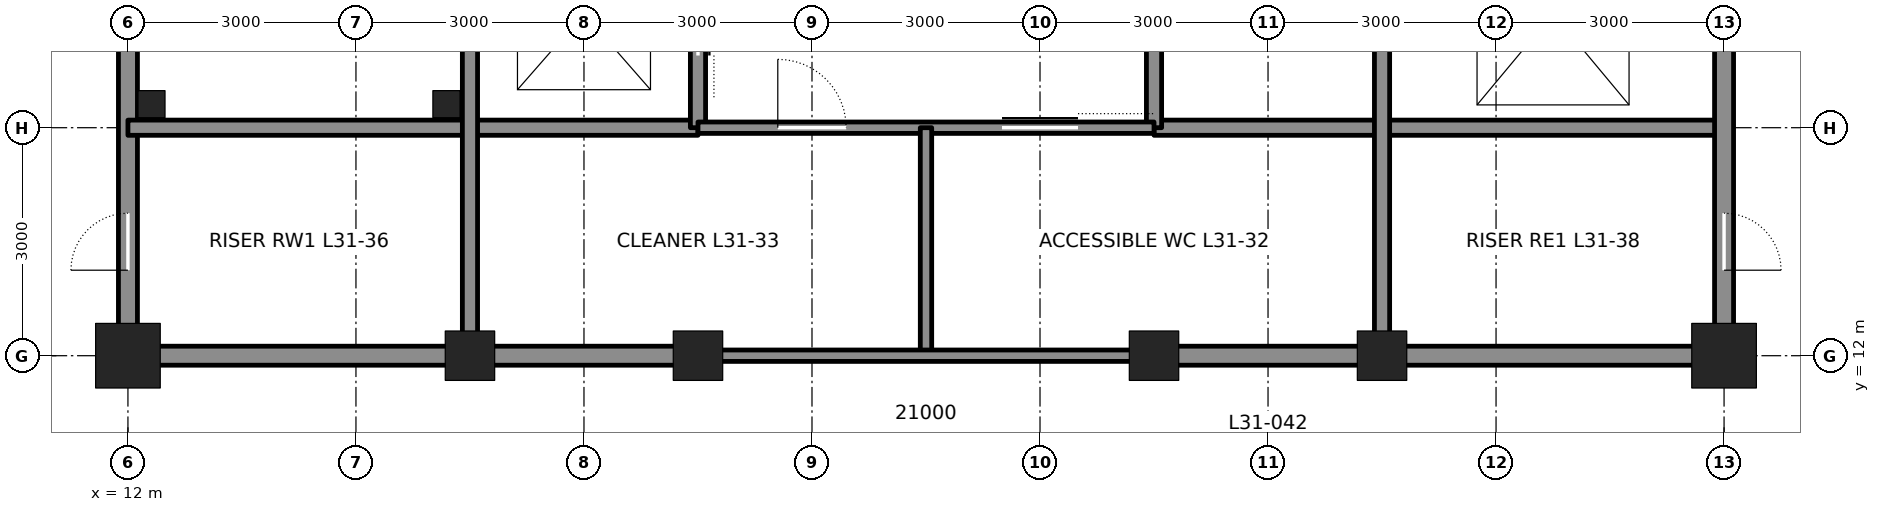
"""IFC4 building model, lengths in metres.
Left out: names, types, materials, properties, quantities, classifications, styles, units other than length and angle.
Written with IfcOpenShell. Run it as: python <this file> out.ifc"""

import sys

from ifc_helpers import new_model, si_unit, direction, frame, frame_2d, origin, origin_2d, place, context, subcontext, project, spatial, rectangle, hollow_rectangle, extrude, element, fill, save


model = new_model("IFC4")
c1 = context("Model", 3, precision=1e-05, world=origin(), true_north=direction((0.0, 1.0)))
c2 = subcontext(c1, "Body", "Model", "MODEL_VIEW")
j1 = project(units=[si_unit("LENGTHUNIT", "METRE"), si_unit("PLANEANGLEUNIT", "RADIAN")], contexts=[c1])
p1 = place(None, origin())
s1 = spatial("IfcSite", under=j1, at=p1, CompositionType="ELEMENT")
p2 = place(p1, origin())
s2 = spatial("IfcBuilding", under=s1, at=p2, CompositionType="ELEMENT")
p3 = place(p2, frame((0.0, 0.0, 144.6)))
s3 = spatial("IfcBuildingStorey", under=s2, at=p3, CompositionType="ELEMENT", Elevation=144.6)
p4 = place(p3, frame((12.0, 12.0, 0.0), z_axis=(0.0, 0.0, 1.0), x_axis=(1.0, 0.0, 0.0)))
e1 = element("IfcColumn", 1, at=p4, inside=s3, PredefinedType="COLUMN", context=c2, shape_type="SweptSolid", body=[
    extrude(hollow_rectangle(XDim=0.85, YDim=0.85, WallThickness=0.085, at=origin_2d()), origin(), (0.0, 0.0, 1.0), 4.2),
])
for number, where, z_axis, x_axis in (
    (2, (16.5, 12.0, 0.0), (0.0, 0.0, 1.0), (1.0, 0.0, 0.0)),
    (3, (19.5, 12.0, 0.0), (0.0, 0.0, 1.0), (1.0, 0.0, 0.0)),
    (4, (25.5, 12.0, 0.0), (0.0, 0.0, 1.0), (1.0, 0.0, 0.0)),
    (5, (28.5, 12.0, 0.0), (0.0, 0.0, 1.0), (1.0, 0.0, 0.0)),
):
    element("IfcColumn", number, at=place(p3, frame(where, z_axis=z_axis, x_axis=x_axis)), inside=s3, PredefinedType="COLUMN", context=c2, shape_type="SweptSolid", body=[
        extrude(hollow_rectangle(XDim=0.65, YDim=0.65, WallThickness=0.065, at=origin_2d()), origin(), (0.0, 0.0, 1.0), 4.2),
    ])
p5 = place(p3, frame((33.0, 12.0, 0.0), z_axis=(0.0, 0.0, 1.0), x_axis=(1.0, 0.0, 0.0)))
e6 = element("IfcColumn", 6, at=p5, inside=s3, PredefinedType="COLUMN", context=c2, shape_type="SweptSolid", body=[
    extrude(hollow_rectangle(XDim=0.85, YDim=0.85, WallThickness=0.085, at=origin_2d()), origin(), (0.0, 0.0, 1.0), 4.2),
])
p6 = place(p3, frame((12.0, 12.25, 0.0), z_axis=(0.0, 0.0, 1.0), x_axis=(0.0, 1.0, 0.0)))
e7 = element("IfcWall", 7, at=p6, inside=s3, PredefinedType="SOLIDWALL", context=c2, shape_type="SweptSolid", body=[
    extrude(rectangle(XDim=8.5, YDim=0.25, at=frame_2d((4.25, 0.0))), origin(), (0.0, 0.0, 1.0), 3.113),
])
p7 = place(p6, frame((0.875, 0.0, 0.0)))
e8 = element("IfcOpeningElement", 8, at=p7, cuts=e7, PredefinedType="OPENING", context=c2, shape_type="SweptSolid", body=[
    extrude(rectangle(XDim=0.75, YDim=2.1, at=frame_2d((0.375, 1.05))), frame((0.0, 0.135, 0.0), z_axis=(0.0, -1.0, 0.0), x_axis=(1.0, 0.0, 0.0)), (0.0, 0.0, 1.0), 0.27),
])
p8 = place(p3, frame((12.25, 12.0, 0.0), z_axis=(0.0, 0.0, 1.0), x_axis=(1.0, 0.0, 0.0)))
e9 = element("IfcWall", 9, at=p8, inside=s3, PredefinedType="SOLIDWALL", context=c2, shape_type="SweptSolid", body=[
    extrude(rectangle(XDim=4.0, YDim=0.25, at=frame_2d((2.0, 0.0))), origin(), (0.0, 0.0, 1.0), 3.181),
])
for number, where, z_axis, x_axis in (
    (10, (16.75, 12.0, 0.0), (0.0, 0.0, 1.0), (1.0, 0.0, 0.0)),
    (11, (25.75, 12.0, 0.0), (0.0, 0.0, 1.0), (1.0, 0.0, 0.0)),
):
    element("IfcWall", number, at=place(p3, frame(where, z_axis=z_axis, x_axis=x_axis)), inside=s3, PredefinedType="SOLIDWALL", context=c2, shape_type="SweptSolid", body=[
        extrude(rectangle(XDim=2.5, YDim=0.25, at=frame_2d((1.25, 0.0))), origin(), (0.0, 0.0, 1.0), 3.181),
    ])
p9 = place(p3, frame((28.75, 12.0, 0.0), z_axis=(0.0, 0.0, 1.0), x_axis=(1.0, 0.0, 0.0)))
e12 = element("IfcWall", 12, at=p9, inside=s3, PredefinedType="SOLIDWALL", context=c2, shape_type="SweptSolid", body=[
    extrude(rectangle(XDim=4.0, YDim=0.25, at=frame_2d((2.0, 0.0))), origin(), (0.0, 0.0, 1.0), 3.181),
])
for number, where, z_axis, x_axis in (
    (13, (12.0, 15.0, 0.0), (0.0, 0.0, 1.0), (1.0, 0.0, 0.0)),
    (14, (25.5, 15.0, 0.0), (0.0, 0.0, 1.0), (1.0, 0.0, 0.0)),
):
    element("IfcWall", number, at=place(p3, frame(where, z_axis=z_axis, x_axis=x_axis)), inside=s3, PredefinedType="SOLIDWALL", context=c2, shape_type="SweptSolid", body=[
        extrude(rectangle(XDim=7.5, YDim=0.2, at=frame_2d((3.75, 0.0))), origin(), (0.0, 0.0, 1.0), 4.04),
    ])
p10 = place(p3, frame((16.5, 12.25, 0.0), z_axis=(0.0, 0.0, 1.0), x_axis=(0.0, 1.0, 0.0)))
e15 = element("IfcWall", 15, at=p10, inside=s3, PredefinedType="SOLIDWALL", context=c2, shape_type="SweptSolid", body=[
    extrude(rectangle(XDim=8.5, YDim=0.2, at=frame_2d((4.25, 0.0))), origin(), (0.0, 0.0, 1.0), 3.113),
])
p11 = place(p3, frame((19.5, 15.0, 0.0), z_axis=(0.0, 0.0, 1.0), x_axis=(0.0, 1.0, 0.0)))
e16 = element("IfcWall", 16, at=p11, inside=s3, PredefinedType="SOLIDWALL", context=c2, shape_type="SweptSolid", body=[
    extrude(rectangle(XDim=12.0, YDim=0.2, at=frame_2d((6.0, 0.0))), origin(), (0.0, 0.0, 1.0), 3.064),
])
p12 = place(p11, frame((0.95, 0.0, 0.0)))
e17 = element("IfcOpeningElement", 17, at=p12, cuts=e16, PredefinedType="OPENING", context=c2, shape_type="SweptSolid", body=[
    extrude(rectangle(XDim=1.1, YDim=2.1, at=frame_2d((0.55, 1.05))), frame((0.0, 0.11, 0.0), z_axis=(0.0, -1.0, 0.0), x_axis=(1.0, 0.0, 0.0)), (0.0, 0.0, 1.0), 0.22),
])
p13 = place(p11, frame((3.95, 0.0, 0.0)))
e18 = element("IfcOpeningElement", 18, at=p13, cuts=e16, PredefinedType="OPENING", context=c2, shape_type="SweptSolid", body=[
    extrude(rectangle(XDim=1.1, YDim=2.1, at=frame_2d((0.55, 1.05))), frame((0.0, 0.11, 0.0), z_axis=(0.0, -1.0, 0.0), x_axis=(1.0, 0.0, 0.0)), (0.0, 0.0, 1.0), 0.22),
])
p14 = place(p11, frame((6.95, 0.0, 0.0)))
e19 = element("IfcOpeningElement", 19, at=p14, cuts=e16, PredefinedType="OPENING", context=c2, shape_type="SweptSolid", body=[
    extrude(rectangle(XDim=1.1, YDim=2.1, at=frame_2d((0.55, 1.05))), frame((0.0, 0.11, 0.0), z_axis=(0.0, -1.0, 0.0), x_axis=(1.0, 0.0, 0.0)), (0.0, 0.0, 1.0), 0.22),
])
p15 = place(p11, frame((9.95, 0.0, 0.0)))
e20 = element("IfcOpeningElement", 20, at=p15, cuts=e16, PredefinedType="OPENING", context=c2, shape_type="SweptSolid", body=[
    extrude(rectangle(XDim=1.1, YDim=2.1, at=frame_2d((0.55, 1.05))), frame((0.0, 0.11, 0.0), z_axis=(0.0, -1.0, 0.0), x_axis=(1.0, 0.0, 0.0)), (0.0, 0.0, 1.0), 0.22),
])
p16 = place(p3, frame((25.5, 15.0, 0.0), z_axis=(0.0, 0.0, 1.0), x_axis=(0.0, 1.0, 0.0)))
e21 = element("IfcWall", 21, at=p16, inside=s3, PredefinedType="SOLIDWALL", context=c2, shape_type="SweptSolid", body=[
    extrude(rectangle(XDim=12.0, YDim=0.2, at=frame_2d((6.0, 0.0))), origin(), (0.0, 0.0, 1.0), 3.064),
])
p17 = place(p3, frame((28.5, 12.25, 0.0), z_axis=(0.0, 0.0, 1.0), x_axis=(0.0, 1.0, 0.0)))
e22 = element("IfcWall", 22, at=p17, inside=s3, PredefinedType="SOLIDWALL", context=c2, shape_type="SweptSolid", body=[
    extrude(rectangle(XDim=8.5, YDim=0.2, at=frame_2d((4.25, 0.0))), origin(), (0.0, 0.0, 1.0), 3.113),
])
p18 = place(p3, frame((33.0, 12.25, 0.0), z_axis=(0.0, 0.0, 1.0), x_axis=(0.0, 1.0, 0.0)))
e23 = element("IfcWall", 23, at=p18, inside=s3, PredefinedType="SOLIDWALL", context=c2, shape_type="SweptSolid", body=[
    extrude(rectangle(XDim=8.5, YDim=0.25, at=frame_2d((4.25, 0.0))), origin(), (0.0, 0.0, 1.0), 3.113),
])
p19 = place(p18, frame((6.65, 0.0, 0.0)))
e24 = element("IfcOpeningElement", 24, at=p19, cuts=e23, PredefinedType="OPENING", context=c2, shape_type="SweptSolid", body=[
    extrude(rectangle(XDim=1.2, YDim=2.1, at=frame_2d((0.6, 1.05))), frame((0.0, 0.135, 0.0), z_axis=(0.0, -1.0, 0.0), x_axis=(1.0, 0.0, 0.0)), (0.0, 0.0, 1.0), 0.27),
])
p20 = place(p18, frame((0.875, 0.0, 0.0)))
e25 = element("IfcOpeningElement", 25, at=p20, cuts=e23, PredefinedType="OPENING", context=c2, shape_type="SweptSolid", body=[
    extrude(rectangle(XDim=0.75, YDim=2.1, at=frame_2d((0.375, 1.05))), frame((0.0, 0.135, 0.0), z_axis=(0.0, -1.0, 0.0), x_axis=(1.0, 0.0, 0.0)), (0.0, 0.0, 1.0), 0.27),
])
p21 = place(p3, frame((19.5, 15.0, 0.0), z_axis=(0.0, 0.0, 1.0), x_axis=(1.0, 0.0, 0.0)))
e26 = element("IfcWall", 26, at=p21, inside=s3, PredefinedType="PARTITIONING", context=c2, shape_type="SweptSolid", body=[
    extrude(rectangle(XDim=6.0, YDim=0.15, at=frame_2d((3.0, 0.0))), origin(), (0.0, 0.0, 1.0), 4.04),
])
p22 = place(p21, frame((4.0, 0.0, 0.0)))
e27 = element("IfcOpeningElement", 27, at=p22, cuts=e26, PredefinedType="OPENING", context=c2, shape_type="SweptSolid", body=[
    extrude(rectangle(XDim=1.0, YDim=2.1, at=frame_2d((0.5, 1.05))), frame((0.0, 0.085, 0.0), z_axis=(0.0, -1.0, 0.0), x_axis=(1.0, 0.0, 0.0)), (0.0, 0.0, 1.0), 0.17),
])
p23 = place(p21, frame((1.05, 0.0, 0.0)))
e28 = element("IfcOpeningElement", 28, at=p23, cuts=e26, PredefinedType="OPENING", context=c2, shape_type="SweptSolid", body=[
    extrude(rectangle(XDim=0.9, YDim=2.1, at=frame_2d((0.45, 1.05))), frame((0.0, 0.085, 0.0), z_axis=(0.0, -1.0, 0.0), x_axis=(1.0, 0.0, 0.0)), (0.0, 0.0, 1.0), 0.17),
])
p24 = place(p3, frame((22.5, 15.0, 0.0), z_axis=(0.0, 0.0, 1.0), x_axis=(0.0, -1.0, 0.0)))
e29 = element("IfcWall", 29, at=p24, inside=s3, PredefinedType="PARTITIONING", context=c2, shape_type="SweptSolid", body=[
    extrude(rectangle(XDim=3.0, YDim=0.15, at=frame_2d((1.5, 0.0))), origin(), (0.0, 0.0, 1.0), 4.04),
])
p25 = place(p3, frame((19.5, 12.0, 0.0), z_axis=(0.0, 0.0, 1.0), x_axis=(1.0, 0.0, 0.0)))
e30 = element("IfcWall", 30, at=p25, inside=s3, PredefinedType="PARTITIONING", context=c2, shape_type="SweptSolid", body=[
    extrude(rectangle(XDim=6.0, YDim=0.15, at=frame_2d((3.0, 0.0))), origin(), (0.0, 0.0, 1.0), 3.181),
])
for number, where, z_axis, x_axis in (
    (31, (12.31, 15.31, 0.0), (0.0, 0.0, 1.0), (1.0, 0.0, 0.0)),
    (32, (16.19, 15.31, 0.0), (0.0, 0.0, 1.0), (1.0, 0.0, 0.0)),
):
    element("IfcColumn", number, at=place(p3, frame(where, z_axis=z_axis, x_axis=x_axis)), inside=s3, PredefinedType="COLUMN", context=c2, shape_type="SweptSolid", body=[
        extrude(hollow_rectangle(XDim=0.356, YDim=0.356, WallThickness=0.015, at=origin_2d()), origin(), (0.0, 0.0, 1.0), 4.2),
    ])
p26 = place(p7, origin())
e33 = element("IfcDoor", 33, at=p26, inside=s3, OperationType="SINGLE_SWING_LEFT", PredefinedType="DOOR", context=c2, shape_type="SweptSolid", body=[
    extrude(rectangle(XDim=0.75, YDim=2.1, at=frame_2d((0.375, 1.05))), frame((0.0, 0.025, 0.0), z_axis=(0.0, -1.0, 0.0), x_axis=(1.0, 0.0, 0.0)), (0.0, 0.0, 1.0), 0.05),
])
fill(e8, e33)
p27 = place(p20, frame((0.75, 0.0, 0.0), z_axis=(0.0, 0.0, 1.0), x_axis=(-1.0, 0.0, 0.0)))
e34 = element("IfcDoor", 34, at=p27, inside=s3, OperationType="SINGLE_SWING_RIGHT", PredefinedType="DOOR", context=c2, shape_type="SweptSolid", body=[
    extrude(rectangle(XDim=0.75, YDim=2.1, at=frame_2d((0.375, 1.05))), frame((0.0, 0.025, 0.0), z_axis=(0.0, -1.0, 0.0), x_axis=(1.0, 0.0, 0.0)), (0.0, 0.0, 1.0), 0.05),
])
fill(e25, e34)
p28 = place(p22, origin())
e35 = element("IfcDoor", 35, at=p28, inside=s3, OperationType="SLIDING_TO_LEFT", PredefinedType="DOOR", context=c2, shape_type="SweptSolid", body=[
    extrude(rectangle(XDim=1.0, YDim=2.1, at=frame_2d((0.5, 1.05))), frame((0.0, 0.025, 0.0), z_axis=(0.0, -1.0, 0.0), x_axis=(1.0, 0.0, 0.0)), (0.0, 0.0, 1.0), 0.05),
])
fill(e27, e35)
p29 = place(p23, origin())
e36 = element("IfcDoor", 36, at=p29, inside=s3, OperationType="SINGLE_SWING_LEFT", PredefinedType="DOOR", context=c2, shape_type="SweptSolid", body=[
    extrude(rectangle(XDim=0.9, YDim=2.1, at=frame_2d((0.45, 1.05))), frame((0.0, 0.025, 0.0), z_axis=(0.0, -1.0, 0.0), x_axis=(1.0, 0.0, 0.0)), (0.0, 0.0, 1.0), 0.05),
])
fill(e28, e36)
p30 = place(p12, origin())
e37 = element("IfcDoor", 37, at=p30, inside=s3, OperationType="DOUBLE_DOOR_SLIDING", PredefinedType="DOOR", context=c2, shape_type="SweptSolid", body=[
    extrude(rectangle(XDim=1.1, YDim=2.1, at=frame_2d((0.55, 1.05))), frame((0.0, 0.025, 0.0), z_axis=(0.0, -1.0, 0.0), x_axis=(1.0, 0.0, 0.0)), (0.0, 0.0, 1.0), 0.05),
])
fill(e17, e37)
save(model, sys.argv[1])
